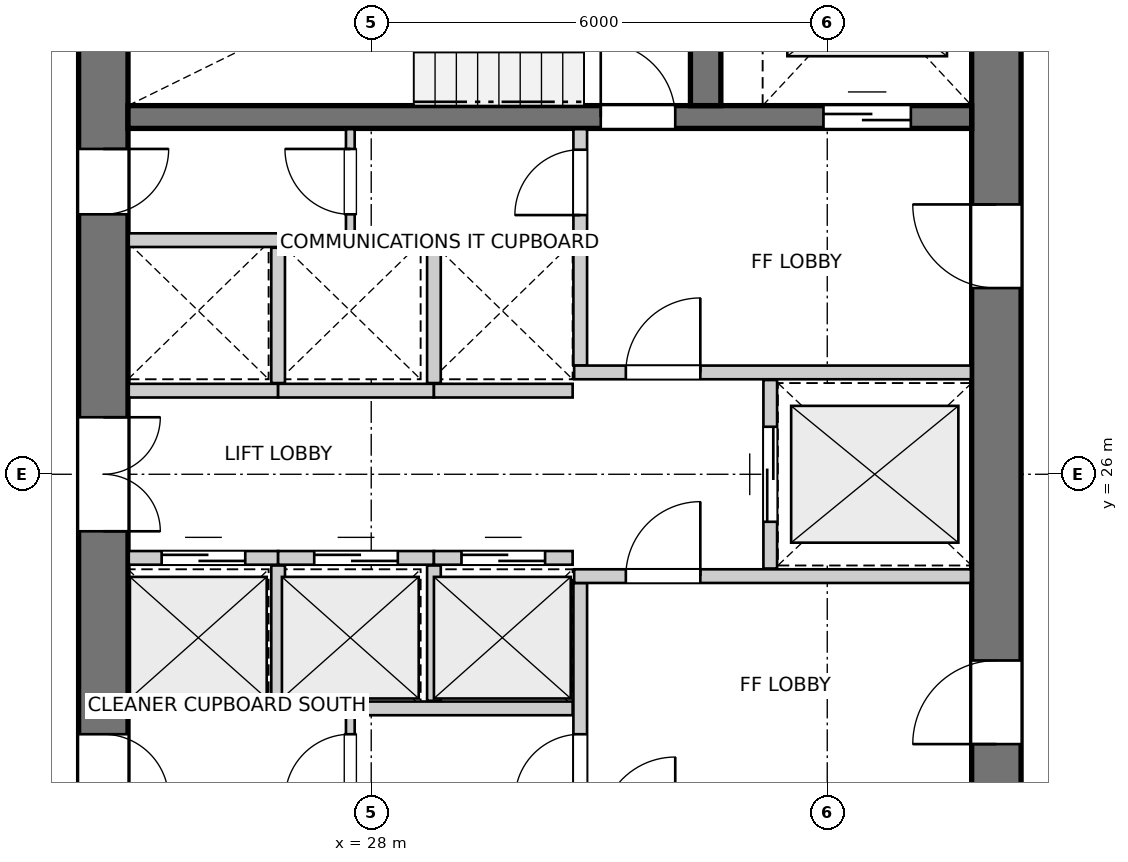
"""IFC4 building model, lengths in metres.
Left out: names, types, materials, properties, quantities, classifications, styles, units other than length and angle.
Written with IfcOpenShell. Run it as: python <this file> out.ifc"""

import sys

from ifc_helpers import new_model, si_unit, direction, frame, frame_2d, origin, place, context, subcontext, project, spatial, rectangle, extrude, source, transform, mapped, element, fill, save


model = new_model("IFC4")
c1 = context("Model", 3, precision=1e-05, world=origin(), true_north=direction((0.0, 1.0)))
c2 = subcontext(c1, "Body", "Model", "MODEL_VIEW")
j1 = project(units=[si_unit("LENGTHUNIT", "METRE"), si_unit("PLANEANGLEUNIT", "RADIAN")], contexts=[c1])
p1 = place(None, origin())
s1 = spatial("IfcSite", under=j1, at=p1, CompositionType="ELEMENT")
p2 = place(p1, origin())
s2 = spatial("IfcBuilding", under=s1, at=p2, CompositionType="ELEMENT")
p3 = place(p2, frame((0.0, 0.0, 115.2)))
s3 = spatial("IfcBuildingStorey", under=s2, at=p3, CompositionType="ELEMENT", Elevation=115.2)
p4 = place(p3, frame((24.475, 33.8, 0.0), z_axis=(0.0, 0.0, 1.0), x_axis=(0.0, -1.0, 0.0)))
e1 = element("IfcWall", 1, at=p4, inside=s3, PredefinedType="SHEAR", context=c2, shape_type="SweptSolid", body=[
    extrude(rectangle(XDim=15.6, YDim=0.65, at=frame_2d((7.8, 0.0))), origin(), (0.0, 0.0, 1.0), 2.95),
])
p5 = place(p4, frame((7.05, 0.0, 0.0)))
e2 = element("IfcOpeningElement", 2, at=p5, cuts=e1, PredefinedType="OPENING", context=c2, shape_type="SweptSolid", body=[
    extrude(rectangle(XDim=1.5, YDim=2.15, at=frame_2d((0.75, 1.075))), frame((0.0, 0.335, 0.0), z_axis=(0.0, -1.0, 0.0), x_axis=(1.0, 0.0, 0.0)), (0.0, 0.0, 1.0), 0.67),
])
p6 = place(p4, frame((3.52, 0.0, 0.0)))
e3 = element("IfcOpeningElement", 3, at=p6, cuts=e1, PredefinedType="OPENING", context=c2, shape_type="SweptSolid", body=[
    extrude(rectangle(XDim=0.86, YDim=2.05, at=frame_2d((0.43, 1.025))), frame((0.0, 0.335, 0.0), z_axis=(0.0, -1.0, 0.0), x_axis=(1.0, 0.0, 0.0)), (0.0, 0.0, 1.0), 0.67),
])
p7 = place(p4, frame((11.22, 0.0, 0.0)))
e4 = element("IfcOpeningElement", 4, at=p7, cuts=e1, PredefinedType="OPENING", context=c2, shape_type="SweptSolid", body=[
    extrude(rectangle(XDim=0.86, YDim=2.05, at=frame_2d((0.43, 1.025))), frame((0.0, 0.335, 0.0), z_axis=(0.0, -1.0, 0.0), x_axis=(1.0, 0.0, 0.0)), (0.0, 0.0, 1.0), 0.67),
])
p8 = place(p3, frame((36.225, 18.2, 0.0), z_axis=(0.0, 0.0, 1.0), x_axis=(0.0, 1.0, 0.0)))
e5 = element("IfcWall", 5, at=p8, inside=s3, PredefinedType="SHEAR", context=c2, shape_type="SweptSolid", body=[
    extrude(rectangle(XDim=15.6, YDim=0.65, at=frame_2d((7.8, 0.0))), origin(), (0.0, 0.0, 1.0), 2.95),
])
p9 = place(p8, frame((4.25, 0.0, 0.0)))
e6 = element("IfcOpeningElement", 6, at=p9, cuts=e5, PredefinedType="OPENING", context=c2, shape_type="SweptSolid", body=[
    extrude(rectangle(XDim=1.1, YDim=2.15, at=frame_2d((0.55, 1.075))), frame((0.0, 0.335, 0.0), z_axis=(0.0, -1.0, 0.0), x_axis=(1.0, 0.0, 0.0)), (0.0, 0.0, 1.0), 0.67),
])
p10 = place(p8, frame((10.25, 0.0, 0.0)))
e7 = element("IfcOpeningElement", 7, at=p10, cuts=e5, PredefinedType="OPENING", context=c2, shape_type="SweptSolid", body=[
    extrude(rectangle(XDim=1.1, YDim=2.15, at=frame_2d((0.55, 1.075))), frame((0.0, 0.335, 0.0), z_axis=(0.0, -1.0, 0.0), x_axis=(1.0, 0.0, 0.0)), (0.0, 0.0, 1.0), 0.67),
])
p11 = place(p3, frame((24.8, 30.7, 0.0), z_axis=(0.0, 0.0, 1.0), x_axis=(1.0, 0.0, 0.0)))
e8 = element("IfcWall", 8, at=p11, inside=s3, PredefinedType="SHEAR", context=c2, shape_type="SweptSolid", body=[
    extrude(rectangle(XDim=11.1, YDim=0.3, at=frame_2d((5.55, 0.0))), origin(), (0.0, 0.0, 1.0), 2.95),
])
p12 = place(p11, frame((6.22, 0.0, 0.0)))
e9 = element("IfcOpeningElement", 9, at=p12, cuts=e8, PredefinedType="OPENING", context=c2, shape_type="SweptSolid", body=[
    extrude(rectangle(XDim=0.98, YDim=2.15, at=frame_2d((0.49, 1.075))), frame((0.0, 0.16, 0.0), z_axis=(0.0, -1.0, 0.0), x_axis=(1.0, 0.0, 0.0)), (0.0, 0.0, 1.0), 0.32),
])
p13 = place(p11, frame((9.15, 0.0, 0.0)))
e10 = element("IfcOpeningElement", 10, at=p13, cuts=e8, PredefinedType="OPENING", context=c2, shape_type="SweptSolid", body=[
    extrude(rectangle(XDim=1.15, YDim=2.15, at=frame_2d((0.575, 1.075))), frame((0.0, 0.16, 0.0), z_axis=(0.0, -1.0, 0.0), x_axis=(1.0, 0.0, 0.0)), (0.0, 0.0, 1.0), 0.32),
])
p14 = place(p3, frame((32.4, 30.85, 0.0), z_axis=(0.0, 0.0, 1.0), x_axis=(0.0, 1.0, 0.0)))
e11 = element("IfcWall", 11, at=p14, inside=s3, PredefinedType="SHEAR", context=c2, shape_type="SweptSolid", body=[
    extrude(rectangle(XDim=2.95, YDim=0.4, at=frame_2d((1.475, 0.0))), origin(), (0.0, 0.0, 1.0), 2.95),
])
p15 = place(p3, frame((30.75, 21.46, 0.0), z_axis=(0.0, 0.0, 1.0), x_axis=(0.0, 1.0, 0.0)))
e12 = element("IfcWall", 12, at=p15, inside=s3, PredefinedType="PARTITIONING", context=c2, shape_type="SweptSolid", body=[
    extrude(rectangle(XDim=3.11, YDim=0.18, at=frame_2d((1.555, 0.0))), origin(), (0.0, 0.0, 1.0), 2.95),
])
p16 = place(p15, frame((0.26, 0.0, 0.0)))
e13 = element("IfcOpeningElement", 13, at=p16, cuts=e12, PredefinedType="OPENING", context=c2, shape_type="SweptSolid", body=[
    extrude(rectangle(XDim=0.86, YDim=2.05, at=frame_2d((0.43, 1.025))), frame((0.0, 0.1, 0.0), z_axis=(0.0, -1.0, 0.0), x_axis=(1.0, 0.0, 0.0)), (0.0, 0.0, 1.0), 0.2),
])
p17 = place(p3, frame((30.67, 24.66, 0.0), z_axis=(0.0, 0.0, 1.0), x_axis=(1.0, 0.0, 0.0)))
e14 = element("IfcWall", 14, at=p17, inside=s3, PredefinedType="PARTITIONING", context=c2, shape_type="SweptSolid", body=[
    extrude(rectangle(XDim=5.22, YDim=0.18, at=frame_2d((2.61, 0.0))), origin(), (0.0, 0.0, 1.0), 2.95),
])
p18 = place(p17, frame((0.68, 0.0, 0.0)))
e15 = element("IfcOpeningElement", 15, at=p18, cuts=e14, PredefinedType="OPENING", context=c2, shape_type="SweptSolid", body=[
    extrude(rectangle(XDim=0.98, YDim=2.15, at=frame_2d((0.49, 1.075))), frame((0.0, 0.1, 0.0), z_axis=(0.0, -1.0, 0.0), x_axis=(1.0, 0.0, 0.0)), (0.0, 0.0, 1.0), 0.2),
])
p19 = place(p3, frame((30.75, 27.43, 0.0), z_axis=(0.0, 0.0, 1.0), x_axis=(0.0, 1.0, 0.0)))
e16 = element("IfcWall", 16, at=p19, inside=s3, PredefinedType="PARTITIONING", context=c2, shape_type="SweptSolid", body=[
    extrude(rectangle(XDim=3.11, YDim=0.18, at=frame_2d((1.555, 0.0))), origin(), (0.0, 0.0, 1.0), 2.95),
])
p20 = place(p19, frame((1.98, 0.0, 0.0)))
e17 = element("IfcOpeningElement", 17, at=p20, cuts=e16, PredefinedType="OPENING", context=c2, shape_type="SweptSolid", body=[
    extrude(rectangle(XDim=0.86, YDim=2.05, at=frame_2d((0.43, 1.025))), frame((0.0, 0.1, 0.0), z_axis=(0.0, -1.0, 0.0), x_axis=(1.0, 0.0, 0.0)), (0.0, 0.0, 1.0), 0.2),
])
p21 = place(p3, frame((30.67, 27.34, 0.0), z_axis=(0.0, 0.0, 1.0), x_axis=(1.0, 0.0, 0.0)))
e18 = element("IfcWall", 18, at=p21, inside=s3, PredefinedType="PARTITIONING", context=c2, shape_type="SweptSolid", body=[
    extrude(rectangle(XDim=5.22, YDim=0.18, at=frame_2d((2.61, 0.0))), origin(), (0.0, 0.0, 1.0), 2.95),
])
p22 = place(p21, frame((0.68, 0.0, 0.0)))
e19 = element("IfcOpeningElement", 19, at=p22, cuts=e18, PredefinedType="OPENING", context=c2, shape_type="SweptSolid", body=[
    extrude(rectangle(XDim=0.98, YDim=2.15, at=frame_2d((0.49, 1.075))), frame((0.0, 0.1, 0.0), z_axis=(0.0, -1.0, 0.0), x_axis=(1.0, 0.0, 0.0)), (0.0, 0.0, 1.0), 0.2),
])
p23 = place(p3, frame((33.25, 24.76, 0.0), z_axis=(0.0, 0.0, 1.0), x_axis=(0.0, 1.0, 0.0)))
e20 = element("IfcWall", 20, at=p23, inside=s3, PredefinedType="PARTITIONING", context=c2, shape_type="SweptSolid", body=[
    extrude(rectangle(XDim=2.48, YDim=0.18, at=frame_2d((1.24, 0.0))), origin(), (0.0, 0.0, 1.0), 2.95),
])
p24 = place(p23, frame((0.615, 0.0, 0.0)))
e21 = element("IfcOpeningElement", 21, at=p24, cuts=e20, PredefinedType="OPENING", context=c2, shape_type="SweptSolid", body=[
    extrude(rectangle(XDim=1.25, YDim=2.15, at=frame_2d((0.625, 1.075))), frame((0.0, 0.1, 0.0), z_axis=(0.0, -1.0, 0.0), x_axis=(1.0, 0.0, 0.0)), (0.0, 0.0, 1.0), 0.2),
])
p25 = place(p3, frame((24.81, 22.92, 0.0), z_axis=(0.0, 0.0, 1.0), x_axis=(1.0, 0.0, 0.0)))
e22 = element("IfcWall", 22, at=p25, inside=s3, PredefinedType="PARTITIONING", context=c2, shape_type="SweptSolid", body=[
    extrude(rectangle(XDim=5.84, YDim=0.18, at=frame_2d((2.92, 0.0))), origin(), (0.0, 0.0, 1.0), 2.95),
])
p26 = place(p3, frame((24.81, 24.9, 0.0), z_axis=(0.0, 0.0, 1.0), x_axis=(1.0, 0.0, 0.0)))
e23 = element("IfcWall", 23, at=p26, inside=s3, PredefinedType="PARTITIONING", context=c2, shape_type="SweptSolid", body=[
    extrude(rectangle(XDim=1.965, YDim=0.18, at=frame_2d((0.982, 0.0))), origin(), (0.0, 0.0, 1.0), 2.95),
])
p27 = place(p26, frame((0.433, 0.0, 0.0)))
e24 = element("IfcOpeningElement", 24, at=p27, cuts=e23, PredefinedType="OPENING", context=c2, shape_type="SweptSolid", body=[
    extrude(rectangle(XDim=1.1, YDim=2.15, at=frame_2d((0.55, 1.075))), frame((0.0, 0.1, 0.0), z_axis=(0.0, -1.0, 0.0), x_axis=(1.0, 0.0, 0.0)), (0.0, 0.0, 1.0), 0.2),
])
p28 = place(p3, frame((26.775, 24.9, 0.0), z_axis=(0.0, 0.0, 1.0), x_axis=(1.0, 0.0, 0.0)))
e25 = element("IfcWall", 25, at=p28, inside=s3, PredefinedType="PARTITIONING", context=c2, shape_type="SweptSolid", body=[
    extrude(rectangle(XDim=2.05, YDim=0.18, at=frame_2d((1.025, 0.0))), origin(), (0.0, 0.0, 1.0), 2.95),
])
p29 = place(p28, frame((0.475, 0.0, 0.0)))
e26 = element("IfcOpeningElement", 26, at=p29, cuts=e25, PredefinedType="OPENING", context=c2, shape_type="SweptSolid", body=[
    extrude(rectangle(XDim=1.1, YDim=2.15, at=frame_2d((0.55, 1.075))), frame((0.0, 0.1, 0.0), z_axis=(0.0, -1.0, 0.0), x_axis=(1.0, 0.0, 0.0)), (0.0, 0.0, 1.0), 0.2),
])
p30 = place(p3, frame((26.775, 23.02, 0.0), z_axis=(0.0, 0.0, 1.0), x_axis=(0.0, 1.0, 0.0)))
e27 = element("IfcWall", 27, at=p30, inside=s3, PredefinedType="PARTITIONING", context=c2, shape_type="SweptSolid", body=[
    extrude(rectangle(XDim=1.78, YDim=0.18, at=frame_2d((0.89, 0.0))), origin(), (0.0, 0.0, 1.0), 2.95),
])
p31 = place(p3, frame((28.825, 24.9, 0.0), z_axis=(0.0, 0.0, 1.0), x_axis=(1.0, 0.0, 0.0)))
e28 = element("IfcWall", 28, at=p31, inside=s3, PredefinedType="PARTITIONING", context=c2, shape_type="SweptSolid", body=[
    extrude(rectangle(XDim=1.825, YDim=0.18, at=frame_2d((0.913, 0.0))), origin(), (0.0, 0.0, 1.0), 2.95),
])
p32 = place(p31, frame((0.363, 0.0, 0.0)))
e29 = element("IfcOpeningElement", 29, at=p32, cuts=e28, PredefinedType="OPENING", context=c2, shape_type="SweptSolid", body=[
    extrude(rectangle(XDim=1.1, YDim=2.15, at=frame_2d((0.55, 1.075))), frame((0.0, 0.1, 0.0), z_axis=(0.0, -1.0, 0.0), x_axis=(1.0, 0.0, 0.0)), (0.0, 0.0, 1.0), 0.2),
])
p33 = place(p3, frame((28.825, 23.02, 0.0), z_axis=(0.0, 0.0, 1.0), x_axis=(0.0, 1.0, 0.0)))
e30 = element("IfcWall", 30, at=p33, inside=s3, PredefinedType="PARTITIONING", context=c2, shape_type="SweptSolid", body=[
    extrude(rectangle(XDim=1.78, YDim=0.18, at=frame_2d((0.89, 0.0))), origin(), (0.0, 0.0, 1.0), 2.95),
])
p34 = place(p3, frame((24.81, 29.08, 0.0), z_axis=(0.0, 0.0, 1.0), x_axis=(1.0, 0.0, 0.0)))
e31 = element("IfcWall", 31, at=p34, inside=s3, PredefinedType="PARTITIONING", context=c2, shape_type="SweptSolid", body=[
    extrude(rectangle(XDim=5.84, YDim=0.18, at=frame_2d((2.92, 0.0))), origin(), (0.0, 0.0, 1.0), 2.95),
])
p35 = place(p3, frame((24.81, 27.1, 0.0), z_axis=(0.0, 0.0, 1.0), x_axis=(1.0, 0.0, 0.0)))
e32 = element("IfcWall", 32, at=p35, inside=s3, PredefinedType="PARTITIONING", context=c2, shape_type="SweptSolid", body=[
    extrude(rectangle(XDim=1.965, YDim=0.18, at=frame_2d((0.982, 0.0))), origin(), (0.0, 0.0, 1.0), 2.95),
])
p36 = place(p3, frame((26.775, 27.1, 0.0), z_axis=(0.0, 0.0, 1.0), x_axis=(1.0, 0.0, 0.0)))
e33 = element("IfcWall", 33, at=p36, inside=s3, PredefinedType="PARTITIONING", context=c2, shape_type="SweptSolid", body=[
    extrude(rectangle(XDim=2.05, YDim=0.18, at=frame_2d((1.025, 0.0))), origin(), (0.0, 0.0, 1.0), 2.95),
])
p37 = place(p3, frame((26.775, 27.2, 0.0), z_axis=(0.0, 0.0, 1.0), x_axis=(0.0, 1.0, 0.0)))
e34 = element("IfcWall", 34, at=p37, inside=s3, PredefinedType="PARTITIONING", context=c2, shape_type="SweptSolid", body=[
    extrude(rectangle(XDim=1.78, YDim=0.18, at=frame_2d((0.89, 0.0))), origin(), (0.0, 0.0, 1.0), 2.95),
])
p38 = place(p3, frame((28.825, 27.1, 0.0), z_axis=(0.0, 0.0, 1.0), x_axis=(1.0, 0.0, 0.0)))
e35 = element("IfcWall", 35, at=p38, inside=s3, PredefinedType="PARTITIONING", context=c2, shape_type="SweptSolid", body=[
    extrude(rectangle(XDim=1.825, YDim=0.18, at=frame_2d((0.913, 0.0))), origin(), (0.0, 0.0, 1.0), 2.95),
])
p39 = place(p3, frame((28.825, 27.2, 0.0), z_axis=(0.0, 0.0, 1.0), x_axis=(0.0, 1.0, 0.0)))
e36 = element("IfcWall", 36, at=p39, inside=s3, PredefinedType="PARTITIONING", context=c2, shape_type="SweptSolid", body=[
    extrude(rectangle(XDim=1.78, YDim=0.18, at=frame_2d((0.89, 0.0))), origin(), (0.0, 0.0, 1.0), 2.95),
])
p40 = place(p3, frame((27.725, 21.46, 0.0), z_axis=(0.0, 0.0, 1.0), x_axis=(0.0, 1.0, 0.0)))
e37 = element("IfcWall", 37, at=p40, inside=s3, PredefinedType="PARTITIONING", context=c2, shape_type="SweptSolid", body=[
    extrude(rectangle(XDim=1.38, YDim=0.115, at=frame_2d((0.69, 0.0))), origin(), (0.0, 0.0, 1.0), 2.95),
])
p41 = place(p40, frame((0.26, 0.0, 0.0)))
e38 = element("IfcOpeningElement", 38, at=p41, cuts=e37, PredefinedType="OPENING", context=c2, shape_type="SweptSolid", body=[
    extrude(rectangle(XDim=0.86, YDim=2.05, at=frame_2d((0.43, 1.025))), frame((0.0, 0.067, 0.0), z_axis=(0.0, -1.0, 0.0), x_axis=(1.0, 0.0, 0.0)), (0.0, 0.0, 1.0), 0.135),
])
p42 = place(p3, frame((27.725, 29.16, 0.0), z_axis=(0.0, 0.0, 1.0), x_axis=(0.0, 1.0, 0.0)))
e39 = element("IfcWall", 39, at=p42, inside=s3, PredefinedType="PARTITIONING", context=c2, shape_type="SweptSolid", body=[
    extrude(rectangle(XDim=1.38, YDim=0.115, at=frame_2d((0.69, 0.0))), origin(), (0.0, 0.0, 1.0), 2.95),
])
p43 = place(p42, frame((0.26, 0.0, 0.0)))
e40 = element("IfcOpeningElement", 40, at=p43, cuts=e39, PredefinedType="OPENING", context=c2, shape_type="SweptSolid", body=[
    extrude(rectangle(XDim=0.86, YDim=2.05, at=frame_2d((0.43, 1.025))), frame((0.0, 0.067, 0.0), z_axis=(0.0, -1.0, 0.0), x_axis=(1.0, 0.0, 0.0)), (0.0, 0.0, 1.0), 0.135),
])
m1 = source(origin(), c2, "Body", "SweptSolid", [
    extrude(rectangle(XDim=0.98, YDim=2.15, at=frame_2d((0.49, 1.075))), frame((0.0, 0.025, 0.0), z_axis=(0.0, -1.0, 0.0), x_axis=(1.0, 0.0, 0.0)), (0.0, 0.0, 1.0), 0.05),
])
p44 = place(p12, origin())
e41 = element("IfcDoor", 41, at=p44, inside=s3, OperationType="SINGLE_SWING_LEFT", PredefinedType="DOOR", context=c2, shape_type="MappedRepresentation", body=[
    mapped(m1, transform((0.0, 0.0, 0.0), x_axis=(1.0, 0.0, 0.0), y_axis=(0.0, 1.0, 0.0), z_axis=(0.0, 0.0, 1.0), scale=1.0)),
])
fill(e9, e41)
m2 = source(origin(), c2, "Body", "SweptSolid", [
    extrude(rectangle(XDim=1.15, YDim=2.15, at=frame_2d((0.575, 1.075))), frame((0.0, 0.025, 0.0), z_axis=(0.0, -1.0, 0.0), x_axis=(1.0, 0.0, 0.0)), (0.0, 0.0, 1.0), 0.05),
])
p45 = place(p13, origin())
e42 = element("IfcDoor", 42, at=p45, inside=s3, OperationType="DOUBLE_DOOR_SLIDING", PredefinedType="DOOR", context=c2, shape_type="MappedRepresentation", body=[
    mapped(m2, transform((0.0, 0.0, 0.0), x_axis=(1.0, 0.0, 0.0), y_axis=(0.0, 1.0, 0.0), z_axis=(0.0, 0.0, 1.0), scale=1.0)),
])
fill(e10, e42)
m3 = source(origin(), c2, "Body", "SweptSolid", [
    extrude(rectangle(XDim=1.1, YDim=2.15, at=frame_2d((0.55, 1.075))), frame((0.0, 0.025, 0.0), z_axis=(0.0, -1.0, 0.0), x_axis=(1.0, 0.0, 0.0)), (0.0, 0.0, 1.0), 0.05),
])
p46 = place(p9, origin())
e43 = element("IfcDoor", 43, at=p46, inside=s3, OperationType="SINGLE_SWING_LEFT", PredefinedType="DOOR", context=c2, shape_type="MappedRepresentation", body=[
    mapped(m3, transform((0.0, 0.0, 0.0), x_axis=(1.0, 0.0, 0.0), y_axis=(0.0, 1.0, 0.0), z_axis=(0.0, 0.0, 1.0), scale=1.0)),
])
fill(e6, e43)
p47 = place(p10, origin())
e44 = element("IfcDoor", 44, at=p47, inside=s3, OperationType="SINGLE_SWING_RIGHT", PredefinedType="DOOR", context=c2, shape_type="MappedRepresentation", body=[
    mapped(m3, transform((0.0, 0.0, 0.0), x_axis=(1.0, 0.0, 0.0), y_axis=(0.0, 1.0, 0.0), z_axis=(0.0, 0.0, 1.0), scale=1.0)),
])
fill(e7, e44)
m4 = source(origin(), c2, "Body", "SweptSolid", [
    extrude(rectangle(XDim=1.5, YDim=2.15, at=frame_2d((0.75, 1.075))), frame((0.0, 0.025, 0.0), z_axis=(0.0, -1.0, 0.0), x_axis=(1.0, 0.0, 0.0)), (0.0, 0.0, 1.0), 0.05),
])
p48 = place(p5, origin())
e45 = element("IfcDoor", 45, at=p48, inside=s3, OperationType="DOUBLE_DOOR_SINGLE_SWING", PredefinedType="DOOR", context=c2, shape_type="MappedRepresentation", body=[
    mapped(m4, transform((0.0, 0.0, 0.0), x_axis=(1.0, 0.0, 0.0), y_axis=(0.0, 1.0, 0.0), z_axis=(0.0, 0.0, 1.0), scale=1.0)),
])
fill(e2, e45)
m5 = source(origin(), c2, "Body", "SweptSolid", [
    extrude(rectangle(XDim=0.86, YDim=2.05, at=frame_2d((0.43, 1.025))), frame((0.0, 0.025, 0.0), z_axis=(0.0, -1.0, 0.0), x_axis=(1.0, 0.0, 0.0)), (0.0, 0.0, 1.0), 0.05),
])
p49 = place(p6, origin())
e46 = element("IfcDoor", 46, at=p49, inside=s3, OperationType="SINGLE_SWING_LEFT", PredefinedType="DOOR", context=c2, shape_type="MappedRepresentation", body=[
    mapped(m5, transform((0.0, 0.0, 0.0), x_axis=(1.0, 0.0, 0.0), y_axis=(0.0, 1.0, 0.0), z_axis=(0.0, 0.0, 1.0), scale=1.0)),
])
fill(e3, e46)
p50 = place(p7, origin())
e47 = element("IfcDoor", 47, at=p50, inside=s3, OperationType="SINGLE_SWING_RIGHT", PredefinedType="DOOR", context=c2, shape_type="MappedRepresentation", body=[
    mapped(m5, transform((0.0, 0.0, 0.0), x_axis=(1.0, 0.0, 0.0), y_axis=(0.0, 1.0, 0.0), z_axis=(0.0, 0.0, 1.0), scale=1.0)),
])
fill(e4, e47)
p51 = place(p16, origin())
e48 = element("IfcDoor", 48, at=p51, inside=s3, OperationType="SINGLE_SWING_LEFT", PredefinedType="DOOR", context=c2, shape_type="MappedRepresentation", body=[
    mapped(m5, transform((0.0, 0.0, 0.0), x_axis=(1.0, 0.0, 0.0), y_axis=(0.0, 1.0, 0.0), z_axis=(0.0, 0.0, 1.0), scale=1.0)),
])
fill(e13, e48)
p52 = place(p18, origin())
e49 = element("IfcDoor", 49, at=p52, inside=s3, OperationType="SINGLE_SWING_RIGHT", PredefinedType="DOOR", context=c2, shape_type="MappedRepresentation", body=[
    mapped(m1, transform((0.0, 0.0, 0.0), x_axis=(1.0, 0.0, 0.0), y_axis=(0.0, 1.0, 0.0), z_axis=(0.0, 0.0, 1.0), scale=1.0)),
])
fill(e15, e49)
p53 = place(p20, origin())
e50 = element("IfcDoor", 50, at=p53, inside=s3, OperationType="SINGLE_SWING_LEFT", PredefinedType="DOOR", context=c2, shape_type="MappedRepresentation", body=[
    mapped(m5, transform((0.0, 0.0, 0.0), x_axis=(1.0, 0.0, 0.0), y_axis=(0.0, 1.0, 0.0), z_axis=(0.0, 0.0, 1.0), scale=1.0)),
])
fill(e17, e50)
p54 = place(p22, origin())
e51 = element("IfcDoor", 51, at=p54, inside=s3, OperationType="SINGLE_SWING_RIGHT", PredefinedType="DOOR", context=c2, shape_type="MappedRepresentation", body=[
    mapped(m1, transform((0.0, 0.0, 0.0), x_axis=(1.0, 0.0, 0.0), y_axis=(0.0, 1.0, 0.0), z_axis=(0.0, 0.0, 1.0), scale=1.0)),
])
fill(e19, e51)
m6 = source(origin(), c2, "Body", "SweptSolid", [
    extrude(rectangle(XDim=1.25, YDim=2.15, at=frame_2d((0.625, 1.075))), frame((0.0, 0.025, 0.0), z_axis=(0.0, -1.0, 0.0), x_axis=(1.0, 0.0, 0.0)), (0.0, 0.0, 1.0), 0.05),
])
p55 = place(p24, origin())
e52 = element("IfcDoor", 52, at=p55, inside=s3, OperationType="DOUBLE_DOOR_SLIDING", PredefinedType="DOOR", context=c2, shape_type="MappedRepresentation", body=[
    mapped(m6, transform((0.0, 0.0, 0.0), x_axis=(1.0, 0.0, 0.0), y_axis=(0.0, 1.0, 0.0), z_axis=(0.0, 0.0, 1.0), scale=1.0)),
])
fill(e21, e52)
p56 = place(p27, origin())
e53 = element("IfcDoor", 53, at=p56, inside=s3, OperationType="DOUBLE_DOOR_SLIDING", PredefinedType="DOOR", context=c2, shape_type="MappedRepresentation", body=[
    mapped(m3, transform((0.0, 0.0, 0.0), x_axis=(1.0, 0.0, 0.0), y_axis=(0.0, 1.0, 0.0), z_axis=(0.0, 0.0, 1.0), scale=1.0)),
])
fill(e24, e53)
p57 = place(p29, origin())
e54 = element("IfcDoor", 54, at=p57, inside=s3, OperationType="DOUBLE_DOOR_SLIDING", PredefinedType="DOOR", context=c2, shape_type="MappedRepresentation", body=[
    mapped(m3, transform((0.0, 0.0, 0.0), x_axis=(1.0, 0.0, 0.0), y_axis=(0.0, 1.0, 0.0), z_axis=(0.0, 0.0, 1.0), scale=1.0)),
])
fill(e26, e54)
p58 = place(p32, origin())
e55 = element("IfcDoor", 55, at=p58, inside=s3, OperationType="DOUBLE_DOOR_SLIDING", PredefinedType="DOOR", context=c2, shape_type="MappedRepresentation", body=[
    mapped(m3, transform((0.0, 0.0, 0.0), x_axis=(1.0, 0.0, 0.0), y_axis=(0.0, 1.0, 0.0), z_axis=(0.0, 0.0, 1.0), scale=1.0)),
])
fill(e29, e55)
p59 = place(p41, origin())
e56 = element("IfcDoor", 56, at=p59, inside=s3, OperationType="SINGLE_SWING_LEFT", PredefinedType="DOOR", context=c2, shape_type="MappedRepresentation", body=[
    mapped(m5, transform((0.0, 0.0, 0.0), x_axis=(1.0, 0.0, 0.0), y_axis=(0.0, 1.0, 0.0), z_axis=(0.0, 0.0, 1.0), scale=1.0)),
])
fill(e38, e56)
p60 = place(p43, origin())
e57 = element("IfcDoor", 57, at=p60, inside=s3, OperationType="SINGLE_SWING_RIGHT", PredefinedType="DOOR", context=c2, shape_type="MappedRepresentation", body=[
    mapped(m5, transform((0.0, 0.0, 0.0), x_axis=(1.0, 0.0, 0.0), y_axis=(0.0, 1.0, 0.0), z_axis=(0.0, 0.0, 1.0), scale=1.0)),
])
fill(e40, e57)
save(model, sys.argv[1])
